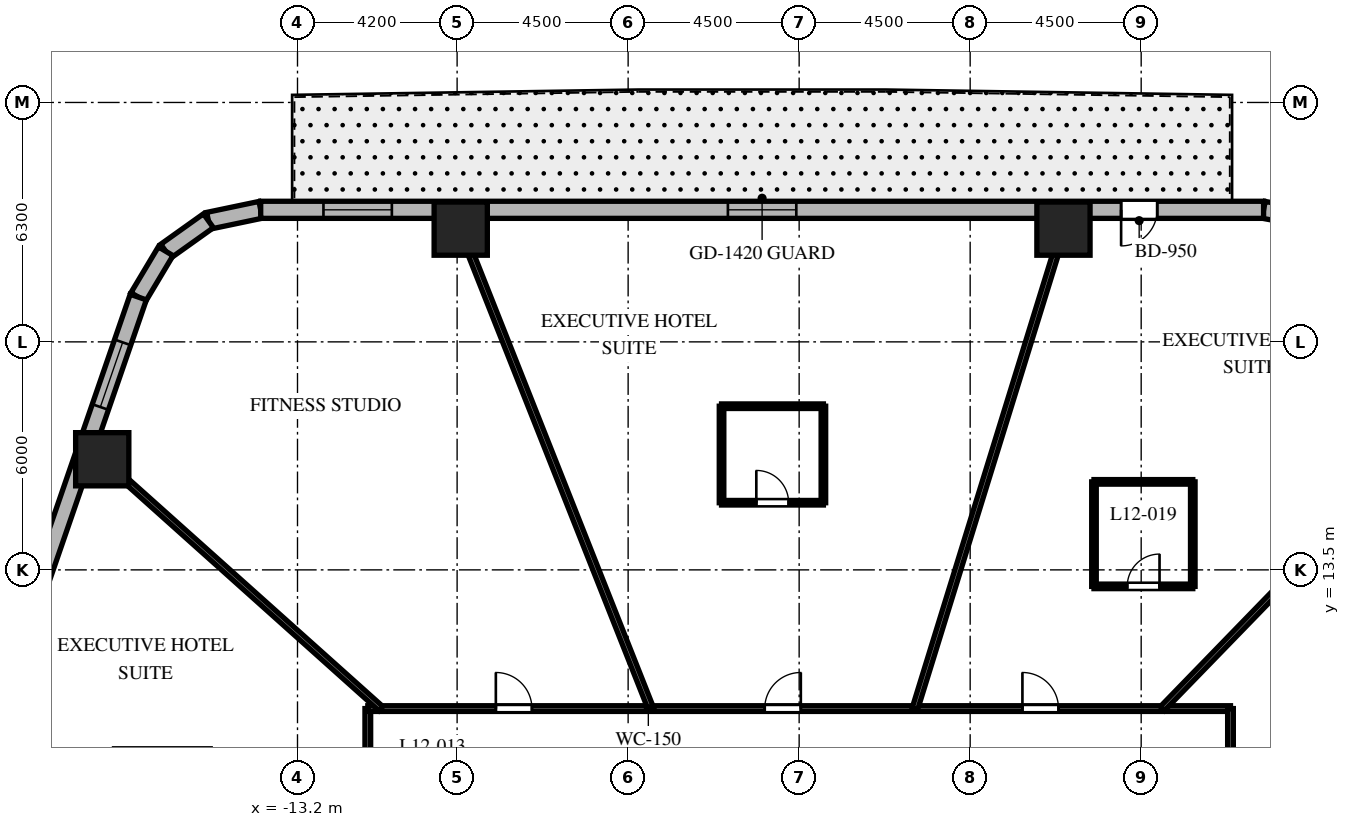
"""IFC4 building model, lengths in metres.
Left out: names, types, materials, properties, quantities, classifications, styles, units other than length and angle.
Written with IfcOpenShell. Run it as: python <this file> out.ifc"""

import sys

from ifc_helpers import new_model, si_unit, direction, frame, frame_2d, origin, origin_2d, place, context, subcontext, project, spatial, rectangle, extrude, element, fill, save


model = new_model("IFC4")
c1 = context("Model", 3, precision=1e-05, world=origin(), true_north=direction((0.0, 1.0)))
c2 = subcontext(c1, "Body", "Model", "MODEL_VIEW")
j1 = project(units=[si_unit("LENGTHUNIT", "METRE"), si_unit("PLANEANGLEUNIT", "RADIAN")], contexts=[c1])
p1 = place(None, origin())
s1 = spatial("IfcSite", under=j1, at=p1, CompositionType="ELEMENT")
p2 = place(p1, origin())
s2 = spatial("IfcBuilding", under=s1, at=p2, CompositionType="ELEMENT")
p3 = place(p2, frame((0.0, 0.0, 56.4)))
s3 = spatial("IfcBuildingStorey", under=s2, at=p3, CompositionType="ELEMENT", Elevation=56.4)
for number, where, z_axis, x_axis in (
    (1, (6.955, 22.48, 0.0), (0.0, 0.0, 1.0), (1.0, 0.0, 0.0)),
    (2, (-8.905, 22.48, 0.0), (0.0, 0.0, 1.0), (1.0, 0.0, 0.0)),
    (3, (-18.338, 16.411, 0.0), (0.0, 0.0, 1.0), (1.0, 0.0, 0.0)),
):
    element("IfcColumn", number, at=place(p3, frame(where, z_axis=z_axis, x_axis=x_axis)), inside=s3, PredefinedType="COLUMN", context=c2, shape_type="SweptSolid", body=[
        extrude(rectangle(XDim=1.4, YDim=1.4, at=origin_2d()), origin(), (0.0, 0.0, 1.0), 3.7),
    ])
p4 = place(p3, frame((13.468, 22.74, 0.0), z_axis=(0.0, 0.0, 1.0), x_axis=(-0.982717174228, 0.185113358451, 0.0)))
e4 = element("IfcWall", 4, at=p4, inside=s3, PredefinedType="SOLIDWALL", context=c2, shape_type="SweptSolid", body=[
    extrude(rectangle(XDim=1.269, YDim=0.45, at=frame_2d((0.634, 0.0))), origin(), (0.0, 0.0, 1.0), 3.4),
])
p5 = place(p3, frame((-14.168, 22.975, 0.0), z_axis=(0.0, 0.0, 1.0), x_axis=(-0.978770371074, -0.204959900243, 0.0)))
e5 = element("IfcWall", 5, at=p5, inside=s3, PredefinedType="SOLIDWALL", context=c2, shape_type="SweptSolid", body=[
    extrude(rectangle(XDim=1.406, YDim=0.45, at=frame_2d((0.703, 0.0))), origin(), (0.0, 0.0, 1.0), 3.4),
])
p6 = place(p3, frame((-15.544, 22.687, 0.0), z_axis=(0.0, 0.0, 1.0), x_axis=(-0.814210854316, -0.580569276412, 0.0)))
e6 = element("IfcWall", 6, at=p6, inside=s3, PredefinedType="SOLIDWALL", context=c2, shape_type="SweptSolid", body=[
    extrude(rectangle(XDim=1.381, YDim=0.45, at=frame_2d((0.691, 0.0))), origin(), (0.0, 0.0, 1.0), 3.4),
])
p7 = place(p3, frame((-16.669, 21.885, 0.0), z_axis=(0.0, 0.0, 1.0), x_axis=(-0.512936712947, -0.858426425799, 0.0)))
e7 = element("IfcWall", 7, at=p7, inside=s3, PredefinedType="SOLIDWALL", context=c2, shape_type="SweptSolid", body=[
    extrude(rectangle(XDim=1.406, YDim=0.45, at=frame_2d((0.703, 0.0))), origin(), (0.0, 0.0, 1.0), 3.4),
])
p8 = place(p3, frame((12.221, 22.975, 0.0), z_axis=(0.0, 0.0, 1.0), x_axis=(-1.0, 0.0, 0.0)))
e8 = element("IfcWall", 8, at=p8, inside=s3, PredefinedType="SOLIDWALL", context=c2, shape_type="SweptSolid", body=[
    extrude(rectangle(XDim=26.389, YDim=0.45, at=frame_2d((13.195, 0.0))), origin(), (0.0, 0.0, 1.0), 3.4),
])
p9 = place(p8, frame((2.799, 0.0, 0.0)))
e9 = element("IfcOpeningElement", 9, at=p9, cuts=e8, PredefinedType="OPENING", context=c2, shape_type="SweptSolid", body=[
    extrude(rectangle(XDim=0.95, YDim=2.15, at=frame_2d((0.475, 1.075))), frame((0.0, 0.235, 0.0), z_axis=(0.0, -1.0, 0.0), x_axis=(1.0, 0.0, 0.0)), (0.0, 0.0, 1.0), 0.47),
])
p10 = place(p8, frame((12.296, 0.0, 0.8)))
e10 = element("IfcOpeningElement", 10, at=p10, cuts=e8, PredefinedType="OPENING", context=c2, shape_type="SweptSolid", body=[
    extrude(rectangle(XDim=1.8, YDim=1.8, at=frame_2d((0.9, 0.9))), frame((0.0, 0.235, 0.0), z_axis=(0.0, -1.0, 0.0), x_axis=(1.0, 0.0, 0.0)), (0.0, 0.0, 1.0), 0.47),
])
p11 = place(p8, frame((22.938, 0.0, 0.8)))
e11 = element("IfcOpeningElement", 11, at=p11, cuts=e8, PredefinedType="OPENING", context=c2, shape_type="SweptSolid", body=[
    extrude(rectangle(XDim=1.8, YDim=1.8, at=frame_2d((0.9, 0.9))), frame((0.0, 0.235, 0.0), z_axis=(0.0, -1.0, 0.0), x_axis=(1.0, 0.0, 0.0)), (0.0, 0.0, 1.0), 0.47),
])
p12 = place(p3, frame((-17.39, 20.678, 0.0), z_axis=(0.0, 0.0, 1.0), x_axis=(-0.326068018294, -0.945346310854, 0.0)))
e12 = element("IfcWall", 12, at=p12, inside=s3, PredefinedType="SOLIDWALL", context=c2, shape_type="SweptSolid", body=[
    extrude(rectangle(XDim=21.793, YDim=0.45, at=frame_2d((10.896, 0.0))), origin(), (0.0, 0.0, 1.0), 3.4),
])
p13 = place(p12, frame((1.26, 0.0, 0.8)))
e13 = element("IfcOpeningElement", 13, at=p13, cuts=e12, PredefinedType="OPENING", context=c2, shape_type="SweptSolid", body=[
    extrude(rectangle(XDim=1.8, YDim=1.8, at=frame_2d((0.9, 0.9))), frame((0.0, 0.235, 0.0), z_axis=(0.0, -1.0, 0.0), x_axis=(1.0, 0.0, 0.0)), (0.0, 0.0, 1.0), 0.47),
])
p14 = place(p12, frame((9.943, 0.0, 0.8)))
e14 = element("IfcOpeningElement", 14, at=p14, cuts=e12, PredefinedType="OPENING", context=c2, shape_type="SweptSolid", body=[
    extrude(rectangle(XDim=1.8, YDim=1.8, at=frame_2d((0.9, 0.9))), frame((0.0, 0.235, 0.0), z_axis=(0.0, -1.0, 0.0), x_axis=(1.0, 0.0, 0.0)), (0.0, 0.0, 1.0), 0.47),
])
p15 = place(p12, frame((18.68, 0.0, 0.8)))
e15 = element("IfcOpeningElement", 15, at=p15, cuts=e12, PredefinedType="OPENING", context=c2, shape_type="SweptSolid", body=[
    extrude(rectangle(XDim=1.8, YDim=1.8, at=frame_2d((0.9, 0.9))), frame((0.0, 0.235, 0.0), z_axis=(0.0, -1.0, 0.0), x_axis=(1.0, 0.0, 0.0)), (0.0, 0.0, 1.0), 0.47),
])
p16 = place(p3, frame((-11.35, -9.85, 0.0), z_axis=(0.0, 0.0, 1.0), x_axis=(0.0, 1.0, 0.0)))
e16 = element("IfcWall", 16, at=p16, inside=s3, PredefinedType="PARTITIONING", context=c2, shape_type="SweptSolid", body=[
    extrude(rectangle(XDim=19.7, YDim=0.15, at=frame_2d((9.85, 0.0))), origin(), (0.0, 0.0, 1.0), 2.84),
])
p17 = place(p16, frame((15.191, 0.0, 0.0)))
e17 = element("IfcOpeningElement", 17, at=p17, cuts=e16, PredefinedType="OPENING", context=c2, shape_type="SweptSolid", body=[
    extrude(rectangle(XDim=0.95, YDim=2.03, at=frame_2d((0.475, 1.015))), frame((0.0, 0.085, 0.0), z_axis=(0.0, -1.0, 0.0), x_axis=(1.0, 0.0, 0.0)), (0.0, 0.0, 1.0), 0.17),
])
p18 = place(p16, frame((8.838, 0.0, 0.0)))
e18 = element("IfcOpeningElement", 18, at=p18, cuts=e16, PredefinedType="OPENING", context=c2, shape_type="SweptSolid", body=[
    extrude(rectangle(XDim=0.95, YDim=2.03, at=frame_2d((0.475, 1.015))), frame((0.0, 0.085, 0.0), z_axis=(0.0, -1.0, 0.0), x_axis=(1.0, 0.0, 0.0)), (0.0, 0.0, 1.0), 0.17),
])
p19 = place(p16, frame((4.704, 0.0, 0.0)))
e19 = element("IfcOpeningElement", 19, at=p19, cuts=e16, PredefinedType="OPENING", context=c2, shape_type="SweptSolid", body=[
    extrude(rectangle(XDim=0.95, YDim=2.03, at=frame_2d((0.475, 1.015))), frame((0.0, 0.085, 0.0), z_axis=(0.0, -1.0, 0.0), x_axis=(1.0, 0.0, 0.0)), (0.0, 0.0, 1.0), 0.17),
])
p20 = place(p16, frame((1.462, 0.0, 0.0)))
e20 = element("IfcOpeningElement", 20, at=p20, cuts=e16, PredefinedType="OPENING", context=c2, shape_type="SweptSolid", body=[
    extrude(rectangle(XDim=0.95, YDim=2.03, at=frame_2d((0.475, 1.015))), frame((0.0, 0.085, 0.0), z_axis=(0.0, -1.0, 0.0), x_axis=(1.0, 0.0, 0.0)), (0.0, 0.0, 1.0), 0.17),
])
p21 = place(p3, frame((-11.35, 9.85, 0.0), z_axis=(0.0, 0.0, 1.0), x_axis=(1.0, 0.0, 0.0)))
e21 = element("IfcWall", 21, at=p21, inside=s3, PredefinedType="PARTITIONING", context=c2, shape_type="SweptSolid", body=[
    extrude(rectangle(XDim=22.7, YDim=0.15, at=frame_2d((11.35, 0.0))), origin(), (0.0, 0.0, 1.0), 2.84),
])
p22 = place(p21, frame((17.225, 0.0, 0.0)))
e22 = element("IfcOpeningElement", 22, at=p22, cuts=e21, PredefinedType="OPENING", context=c2, shape_type="SweptSolid", body=[
    extrude(rectangle(XDim=0.95, YDim=2.03, at=frame_2d((0.475, 1.015))), frame((0.0, 0.085, 0.0), z_axis=(0.0, -1.0, 0.0), x_axis=(1.0, 0.0, 0.0)), (0.0, 0.0, 1.0), 0.17),
])
p23 = place(p21, frame((10.444, 0.0, 0.0)))
e23 = element("IfcOpeningElement", 23, at=p23, cuts=e21, PredefinedType="OPENING", context=c2, shape_type="SweptSolid", body=[
    extrude(rectangle(XDim=0.95, YDim=2.03, at=frame_2d((0.475, 1.015))), frame((0.0, 0.085, 0.0), z_axis=(0.0, -1.0, 0.0), x_axis=(1.0, 0.0, 0.0)), (0.0, 0.0, 1.0), 0.17),
])
p24 = place(p21, frame((3.369, 0.0, 0.0)))
e24 = element("IfcOpeningElement", 24, at=p24, cuts=e21, PredefinedType="OPENING", context=c2, shape_type="SweptSolid", body=[
    extrude(rectangle(XDim=0.95, YDim=2.03, at=frame_2d((0.475, 1.015))), frame((0.0, 0.085, 0.0), z_axis=(0.0, -1.0, 0.0), x_axis=(1.0, 0.0, 0.0)), (0.0, 0.0, 1.0), 0.17),
])
p25 = place(p3, frame((11.35, 9.85, 0.0), z_axis=(0.0, 0.0, 1.0), x_axis=(0.0, -1.0, 0.0)))
e25 = element("IfcWall", 25, at=p25, inside=s3, PredefinedType="PARTITIONING", context=c2, shape_type="SweptSolid", body=[
    extrude(rectangle(XDim=19.7, YDim=0.15, at=frame_2d((9.85, 0.0))), origin(), (0.0, 0.0, 1.0), 2.84),
])
p26 = place(p25, frame((4.704, 0.0, 0.0)))
e26 = element("IfcOpeningElement", 26, at=p26, cuts=e25, PredefinedType="OPENING", context=c2, shape_type="SweptSolid", body=[
    extrude(rectangle(XDim=0.95, YDim=2.03, at=frame_2d((0.475, 1.015))), frame((0.0, 0.085, 0.0), z_axis=(0.0, -1.0, 0.0), x_axis=(1.0, 0.0, 0.0)), (0.0, 0.0, 1.0), 0.17),
])
p27 = place(p25, frame((1.462, 0.0, 0.0)))
e27 = element("IfcOpeningElement", 27, at=p27, cuts=e25, PredefinedType="OPENING", context=c2, shape_type="SweptSolid", body=[
    extrude(rectangle(XDim=0.95, YDim=2.03, at=frame_2d((0.475, 1.015))), frame((0.0, 0.085, 0.0), z_axis=(0.0, -1.0, 0.0), x_axis=(1.0, 0.0, 0.0)), (0.0, 0.0, 1.0), 0.17),
])
p28 = place(p25, frame((15.191, 0.0, 0.0)))
e28 = element("IfcOpeningElement", 28, at=p28, cuts=e25, PredefinedType="OPENING", context=c2, shape_type="SweptSolid", body=[
    extrude(rectangle(XDim=0.95, YDim=2.03, at=frame_2d((0.475, 1.015))), frame((0.0, 0.085, 0.0), z_axis=(0.0, -1.0, 0.0), x_axis=(1.0, 0.0, 0.0)), (0.0, 0.0, 1.0), 0.17),
])
p29 = place(p25, frame((8.838, 0.0, 0.0)))
e29 = element("IfcOpeningElement", 29, at=p29, cuts=e25, PredefinedType="OPENING", context=c2, shape_type="SweptSolid", body=[
    extrude(rectangle(XDim=0.95, YDim=2.03, at=frame_2d((0.475, 1.015))), frame((0.0, 0.085, 0.0), z_axis=(0.0, -1.0, 0.0), x_axis=(1.0, 0.0, 0.0)), (0.0, 0.0, 1.0), 0.17),
])
p30 = place(p3, frame((11.35, 6.217, 0.0), z_axis=(0.0, 0.0, 1.0), x_axis=(0.877047587135, 0.480403507378, 0.0)))
e30 = element("IfcWall", 30, at=p30, inside=s3, PredefinedType="PARTITIONING", context=c2, shape_type="SweptSolid", body=[
    extrude(rectangle(XDim=10.062, YDim=0.15, at=frame_2d((5.031, 0.0))), origin(), (0.0, 0.0, 1.0), 2.54),
])
p31 = place(p3, frame((9.558, 9.85, 0.0), z_axis=(0.0, 0.0, 1.0), x_axis=(0.69638346089, 0.717669893056, 0.0)))
e31 = element("IfcWall", 31, at=p31, inside=s3, PredefinedType="PARTITIONING", context=c2, shape_type="SweptSolid", body=[
    extrude(rectangle(XDim=10.701, YDim=0.15, at=frame_2d((5.351, 0.0))), origin(), (0.0, 0.0, 1.0), 2.54),
])
p32 = place(p3, frame((3.048, 9.85, 0.0), z_axis=(0.0, 0.0, 1.0), x_axis=(0.295553992761, 0.955326037206, 0.0)))
e32 = element("IfcWall", 32, at=p32, inside=s3, PredefinedType="PARTITIONING", context=c2, shape_type="SweptSolid", body=[
    extrude(rectangle(XDim=13.739, YDim=0.15, at=frame_2d((6.869, 0.0))), origin(), (0.0, 0.0, 1.0), 2.54),
])
p33 = place(p3, frame((-3.902, 9.85, 0.0), z_axis=(0.0, 0.0, 1.0), x_axis=(-0.36828765711, 0.929711891728, 0.0)))
e33 = element("IfcWall", 33, at=p33, inside=s3, PredefinedType="PARTITIONING", context=c2, shape_type="SweptSolid", body=[
    extrude(rectangle(XDim=14.117, YDim=0.15, at=frame_2d((7.059, 0.0))), origin(), (0.0, 0.0, 1.0), 2.54),
])
p34 = place(p3, frame((-11.007, 9.85, 0.0), z_axis=(0.0, 0.0, 1.0), x_axis=(-0.745177305978, 0.666866390407, 0.0)))
e34 = element("IfcWall", 34, at=p34, inside=s3, PredefinedType="PARTITIONING", context=c2, shape_type="SweptSolid", body=[
    extrude(rectangle(XDim=10.375, YDim=0.15, at=frame_2d((5.188, 0.0))), origin(), (0.0, 0.0, 1.0), 2.54),
])
p35 = place(p3, frame((7.758, 13.066, 0.0), z_axis=(0.0, 0.0, 1.0), x_axis=(1.0, 0.0, 0.0)))
e35 = element("IfcWall", 35, at=p35, inside=s3, PredefinedType="PARTITIONING", context=c2, shape_type="SweptSolid", body=[
    extrude(rectangle(XDim=2.6, YDim=0.12, at=frame_2d((1.3, 0.0))), origin(), (0.0, 0.0, 1.0), 2.84),
])
p36 = place(p35, frame((0.875, 0.0, 0.0)))
e36 = element("IfcOpeningElement", 36, at=p36, cuts=e35, PredefinedType="OPENING", context=c2, shape_type="SweptSolid", body=[
    extrude(rectangle(XDim=0.85, YDim=2.03, at=frame_2d((0.425, 1.015))), frame((0.0, 0.07, 0.0), z_axis=(0.0, -1.0, 0.0), x_axis=(1.0, 0.0, 0.0)), (0.0, 0.0, 1.0), 0.14),
])
p37 = place(p3, frame((10.358, 13.066, 0.0), z_axis=(0.0, 0.0, 1.0), x_axis=(0.0, 1.0, 0.0)))
e37 = element("IfcWall", 37, at=p37, inside=s3, PredefinedType="PARTITIONING", context=c2, shape_type="SweptSolid", body=[
    extrude(rectangle(XDim=2.75, YDim=0.12, at=frame_2d((1.375, 0.0))), origin(), (0.0, 0.0, 1.0), 3.4),
])
p38 = place(p3, frame((10.358, 15.816, 0.0), z_axis=(0.0, 0.0, 1.0), x_axis=(-1.0, 0.0, 0.0)))
e38 = element("IfcWall", 38, at=p38, inside=s3, PredefinedType="PARTITIONING", context=c2, shape_type="SweptSolid", body=[
    extrude(rectangle(XDim=2.6, YDim=0.12, at=frame_2d((1.3, 0.0))), origin(), (0.0, 0.0, 1.0), 2.84),
])
p39 = place(p3, frame((7.758, 15.816, 0.0), z_axis=(0.0, 0.0, 1.0), x_axis=(0.0, -1.0, 0.0)))
e39 = element("IfcWall", 39, at=p39, inside=s3, PredefinedType="PARTITIONING", context=c2, shape_type="SweptSolid", body=[
    extrude(rectangle(XDim=2.75, YDim=0.12, at=frame_2d((1.375, 0.0))), origin(), (0.0, 0.0, 1.0), 2.84),
])
p40 = place(p3, frame((-2.042, 15.267, 0.0), z_axis=(0.0, 0.0, 1.0), x_axis=(1.0, 0.0, 0.0)))
e40 = element("IfcWall", 40, at=p40, inside=s3, PredefinedType="PARTITIONING", context=c2, shape_type="SweptSolid", body=[
    extrude(rectangle(XDim=2.68, YDim=0.12, at=frame_2d((1.34, 0.0))), origin(), (0.0, 0.0, 1.0), 3.4),
])
p41 = place(p40, frame((0.915, 0.0, 0.0)))
e41 = element("IfcOpeningElement", 41, at=p41, cuts=e40, PredefinedType="OPENING", context=c2, shape_type="SweptSolid", body=[
    extrude(rectangle(XDim=0.85, YDim=2.03, at=frame_2d((0.425, 1.015))), frame((0.0, 0.07, 0.0), z_axis=(0.0, -1.0, 0.0), x_axis=(1.0, 0.0, 0.0)), (0.0, 0.0, 1.0), 0.14),
])
p42 = place(p3, frame((0.638, 15.267, 0.0), z_axis=(0.0, 0.0, 1.0), x_axis=(0.0, 1.0, 0.0)))
e42 = element("IfcWall", 42, at=p42, inside=s3, PredefinedType="PARTITIONING", context=c2, shape_type="SweptSolid", body=[
    extrude(rectangle(XDim=2.54, YDim=0.12, at=frame_2d((1.27, 0.0))), origin(), (0.0, 0.0, 1.0), 2.841),
])
p43 = place(p3, frame((0.638, 17.807, 0.0), z_axis=(0.0, 0.0, 1.0), x_axis=(-1.0, 0.0, 0.0)))
e43 = element("IfcWall", 43, at=p43, inside=s3, PredefinedType="PARTITIONING", context=c2, shape_type="SweptSolid", body=[
    extrude(rectangle(XDim=2.68, YDim=0.12, at=frame_2d((1.34, 0.0))), origin(), (0.0, 0.0, 1.0), 2.841),
])
p44 = place(p3, frame((-2.042, 17.807, 0.0), z_axis=(0.0, 0.0, 1.0), x_axis=(0.0, -1.0, 0.0)))
e44 = element("IfcWall", 44, at=p44, inside=s3, PredefinedType="PARTITIONING", context=c2, shape_type="SweptSolid", body=[
    extrude(rectangle(XDim=2.54, YDim=0.12, at=frame_2d((1.27, 0.0))), origin(), (0.0, 0.0, 1.0), 2.841),
])
p45 = place(p9, origin())
e45 = element("IfcDoor", 45, at=p45, inside=s3, OperationType="SINGLE_SWING_RIGHT", PredefinedType="DOOR", context=c2, shape_type="SweptSolid", body=[
    extrude(rectangle(XDim=0.95, YDim=2.15, at=frame_2d((0.475, 1.075))), frame((0.0, 0.025, 0.0), z_axis=(0.0, -1.0, 0.0), x_axis=(1.0, 0.0, 0.0)), (0.0, 0.0, 1.0), 0.05),
])
fill(e9, e45)
p46 = place(p10, origin())
e46 = element("IfcWindow", 46, at=p46, inside=s3, PartitioningType="SINGLE_PANEL", PredefinedType="WINDOW", context=c2, shape_type="SweptSolid", body=[
    extrude(rectangle(XDim=1.8, YDim=1.8, at=frame_2d((0.9, 0.9))), frame((0.0, 0.03, 0.0), z_axis=(0.0, -1.0, 0.0), x_axis=(1.0, 0.0, 0.0)), (0.0, 0.0, 1.0), 0.06),
])
fill(e10, e46)
p47 = place(p11, origin())
e47 = element("IfcWindow", 47, at=p47, inside=s3, PartitioningType="SINGLE_PANEL", PredefinedType="WINDOW", context=c2, shape_type="SweptSolid", body=[
    extrude(rectangle(XDim=1.8, YDim=1.8, at=frame_2d((0.9, 0.9))), frame((0.0, 0.03, 0.0), z_axis=(0.0, -1.0, 0.0), x_axis=(1.0, 0.0, 0.0)), (0.0, 0.0, 1.0), 0.06),
])
fill(e11, e47)
p48 = place(p13, origin())
e48 = element("IfcWindow", 48, at=p48, inside=s3, PartitioningType="SINGLE_PANEL", PredefinedType="WINDOW", context=c2, shape_type="SweptSolid", body=[
    extrude(rectangle(XDim=1.8, YDim=1.8, at=frame_2d((0.9, 0.9))), frame((0.0, 0.03, 0.0), z_axis=(0.0, -1.0, 0.0), x_axis=(1.0, 0.0, 0.0)), (0.0, 0.0, 1.0), 0.06),
])
fill(e13, e48)
p49 = place(p22, origin())
e49 = element("IfcDoor", 49, at=p49, inside=s3, OperationType="SINGLE_SWING_LEFT", PredefinedType="DOOR", context=c2, shape_type="SweptSolid", body=[
    extrude(rectangle(XDim=0.95, YDim=2.03, at=frame_2d((0.475, 1.015))), frame((0.0, 0.025, 0.0), z_axis=(0.0, -1.0, 0.0), x_axis=(1.0, 0.0, 0.0)), (0.0, 0.0, 1.0), 0.05),
])
fill(e22, e49)
p50 = place(p36, origin())
e50 = element("IfcDoor", 50, at=p50, inside=s3, OperationType="SINGLE_SWING_RIGHT", PredefinedType="DOOR", context=c2, shape_type="SweptSolid", body=[
    extrude(rectangle(XDim=0.85, YDim=2.03, at=frame_2d((0.425, 1.015))), frame((0.0, 0.025, 0.0), z_axis=(0.0, -1.0, 0.0), x_axis=(1.0, 0.0, 0.0)), (0.0, 0.0, 1.0), 0.05),
])
fill(e36, e50)
p51 = place(p23, origin())
e51 = element("IfcDoor", 51, at=p51, inside=s3, OperationType="SINGLE_SWING_RIGHT", PredefinedType="DOOR", context=c2, shape_type="SweptSolid", body=[
    extrude(rectangle(XDim=0.95, YDim=2.03, at=frame_2d((0.475, 1.015))), frame((0.0, 0.025, 0.0), z_axis=(0.0, -1.0, 0.0), x_axis=(1.0, 0.0, 0.0)), (0.0, 0.0, 1.0), 0.05),
])
fill(e23, e51)
p52 = place(p41, origin())
e52 = element("IfcDoor", 52, at=p52, inside=s3, OperationType="SINGLE_SWING_LEFT", PredefinedType="DOOR", context=c2, shape_type="SweptSolid", body=[
    extrude(rectangle(XDim=0.85, YDim=2.03, at=frame_2d((0.425, 1.015))), frame((0.0, 0.025, 0.0), z_axis=(0.0, -1.0, 0.0), x_axis=(1.0, 0.0, 0.0)), (0.0, 0.0, 1.0), 0.05),
])
fill(e41, e52)
p53 = place(p24, origin())
e53 = element("IfcDoor", 53, at=p53, inside=s3, OperationType="SINGLE_SWING_LEFT", PredefinedType="DOOR", context=c2, shape_type="SweptSolid", body=[
    extrude(rectangle(XDim=0.95, YDim=2.03, at=frame_2d((0.475, 1.015))), frame((0.0, 0.025, 0.0), z_axis=(0.0, -1.0, 0.0), x_axis=(1.0, 0.0, 0.0)), (0.0, 0.0, 1.0), 0.05),
])
fill(e24, e53)
save(model, sys.argv[1])
